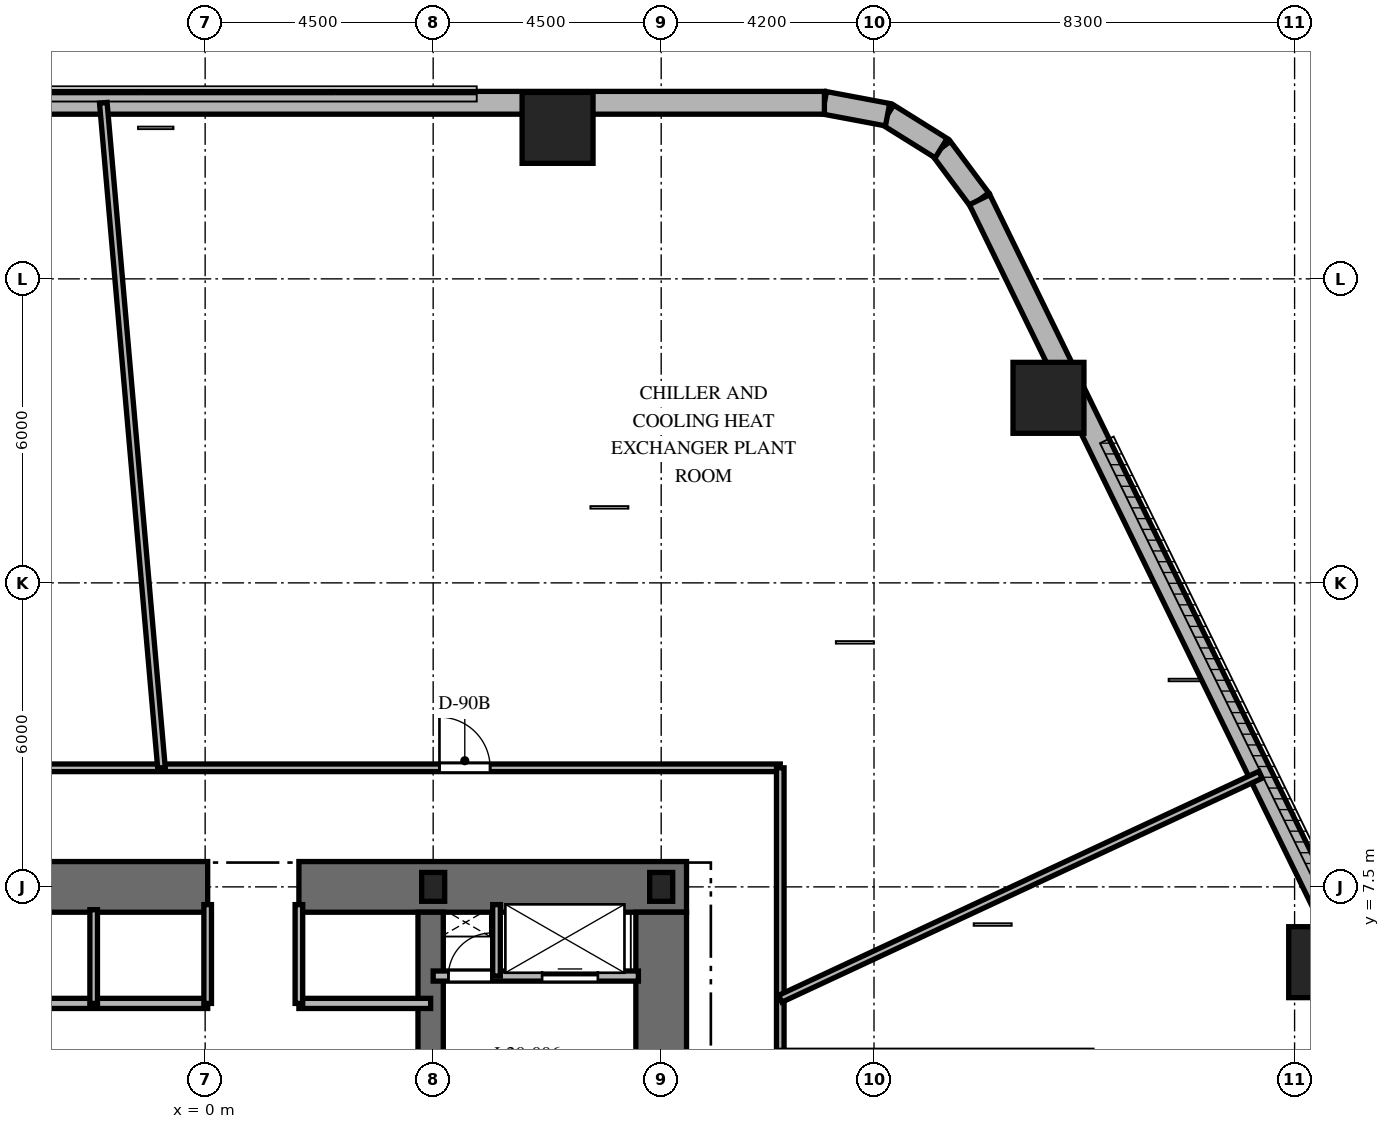
"""IFC4 building model, lengths in metres.
Left out: names, types, materials, properties, quantities, classifications, styles, units other than length and angle.
Written with IfcOpenShell. Run it as: python <this file> out.ifc"""

import sys

from ifc_helpers import new_model, si_unit, direction, frame, frame_2d, origin, origin_2d, place, context, subcontext, project, spatial, rectangle, i_section, extrude, element, fill, save


model = new_model("IFC4")
c1 = context("Model", 3, precision=1e-05, world=origin(), true_north=direction((0.0, 1.0)))
c2 = subcontext(c1, "Body", "Model", "MODEL_VIEW")
j1 = project(units=[si_unit("LENGTHUNIT", "METRE"), si_unit("PLANEANGLEUNIT", "RADIAN")], contexts=[c1])
p1 = place(None, origin())
s1 = spatial("IfcSite", under=j1, at=p1, CompositionType="ELEMENT")
p2 = place(p1, origin())
s2 = spatial("IfcBuilding", under=s1, at=p2, CompositionType="ELEMENT")
p3 = place(p2, frame((0.0, 0.0, 86.0)))
s3 = spatial("IfcBuildingStorey", under=s2, at=p3, CompositionType="ELEMENT", Elevation=86.0)
p4 = place(p3, frame((-9.5, 7.5, 0.0), z_axis=(0.0, 0.0, 1.0), x_axis=(1.0, 0.0, 0.0)))
e1 = element("IfcWall", 1, at=p4, inside=s3, PredefinedType="SHEAR", context=c2, shape_type="SweptSolid", body=[
    extrude(rectangle(XDim=9.55, YDim=1.0, at=frame_2d((4.775, 0.0))), origin(), (0.0, 0.0, 1.0), 5.4),
])
p5 = place(p3, frame((1.85, 7.5, 0.0), z_axis=(0.0, 0.0, 1.0), x_axis=(1.0, 0.0, 0.0)))
e2 = element("IfcWall", 2, at=p5, inside=s3, PredefinedType="SHEAR", context=c2, shape_type="SweptSolid", body=[
    extrude(rectangle(XDim=7.65, YDim=1.0, at=frame_2d((3.825, 0.0))), origin(), (0.0, 0.0, 1.0), 5.4),
])
p6 = place(p3, frame((9.0, -7.0, 0.0), z_axis=(0.0, 0.0, 1.0), x_axis=(0.0, 1.0, 0.0)))
e3 = element("IfcWall", 3, at=p6, inside=s3, PredefinedType="SHEAR", context=c2, shape_type="SweptSolid", body=[
    extrude(rectangle(XDim=14.0, YDim=1.0, at=frame_2d((7.0, 0.0))), origin(), (0.0, 0.0, 1.0), 5.4),
])
p7 = place(p6, frame((10.125, 0.0, 0.0)))
e4 = element("IfcOpeningElement", 4, at=p7, cuts=e3, PredefinedType="OPENING", context=c2, shape_type="SweptSolid", body=[
    extrude(rectangle(XDim=1.05, YDim=2.15, at=frame_2d((0.525, 1.075))), frame((0.0, 0.51, 0.0), z_axis=(0.0, -1.0, 0.0), x_axis=(1.0, 0.0, 0.0)), (0.0, 0.0, 1.0), 1.02),
])
p8 = place(p3, frame((4.45, 2.25, 0.0), z_axis=(0.0, 0.0, 1.0), x_axis=(0.0, 1.0, 0.0)))
e5 = element("IfcWall", 5, at=p8, inside=s3, PredefinedType="SHEAR", context=c2, shape_type="SweptSolid", body=[
    extrude(rectangle(XDim=4.75, YDim=0.5, at=frame_2d((2.375, 0.0))), origin(), (0.0, 0.0, 1.0), 5.4),
])
for number, where, z_axis, x_axis in (
    (6, (9.0, 7.5, 0.0), (0.0, 0.0, 1.0), (1.0, 0.0, 0.0)),
    (7, (4.5, 7.5, 0.0), (0.0, 0.0, 1.0), (1.0, 0.0, 0.0)),
):
    element("IfcColumn", number, at=place(p3, frame(where, z_axis=z_axis, x_axis=x_axis)), inside=s3, PredefinedType="COLUMN", context=c2, shape_type="SweptSolid", body=[
        extrude(i_section(OverallWidth=0.454, OverallDepth=0.569, WebThickness=0.078, FlangeThickness=0.125, at=origin_2d()), origin(), (0.0, 0.0, 1.0), 5.4),
    ])
for number, where, z_axis, x_axis in (
    (8, (22.084, 6.014, 0.0), (0.0, 0.0, 1.0), (1.0, 0.0, 0.0)),
    (9, (16.643, 17.152, 0.0), (0.0, 0.0, 1.0), (1.0, 0.0, 0.0)),
    (10, (6.955, 22.48, 0.0), (0.0, 0.0, 1.0), (1.0, 0.0, 0.0)),
):
    element("IfcColumn", number, at=place(p3, frame(where, z_axis=z_axis, x_axis=x_axis)), inside=s3, PredefinedType="COLUMN", context=c2, shape_type="SweptSolid", body=[
        extrude(rectangle(XDim=1.4, YDim=1.4, at=origin_2d()), origin(), (0.0, 0.0, 1.0), 5.4),
    ])
p9 = place(p3, frame((15.284, 21.062, 0.0), z_axis=(0.0, 0.0, 1.0), x_axis=(-0.597595366449, 0.801797841104, 0.0)))
e11 = element("IfcWall", 11, at=p9, inside=s3, PredefinedType="SOLIDWALL", context=c2, shape_type="SweptSolid", body=[
    extrude(rectangle(XDim=1.269, YDim=0.45, at=frame_2d((0.634, 0.0))), origin(), (0.0, 0.0, 1.0), 5.1),
])
p10 = place(p3, frame((14.526, 22.08, 0.0), z_axis=(0.0, 0.0, 1.0), x_axis=(-0.848185203596, 0.529699783275, 0.0)))
e12 = element("IfcWall", 12, at=p10, inside=s3, PredefinedType="SOLIDWALL", context=c2, shape_type="SweptSolid", body=[
    extrude(rectangle(XDim=1.247, YDim=0.45, at=frame_2d((0.624, 0.0))), origin(), (0.0, 0.0, 1.0), 5.1),
])
p11 = place(p3, frame((13.468, 22.74, 0.0), z_axis=(0.0, 0.0, 1.0), x_axis=(-0.982717174228, 0.185113358451, 0.0)))
e13 = element("IfcWall", 13, at=p11, inside=s3, PredefinedType="SOLIDWALL", context=c2, shape_type="SweptSolid", body=[
    extrude(rectangle(XDim=1.269, YDim=0.45, at=frame_2d((0.634, 0.0))), origin(), (0.0, 0.0, 1.0), 5.1),
])
p12 = place(p3, frame((24.336, 2.532, 0.0), z_axis=(0.0, 0.0, 1.0), x_axis=(-0.438931326393, 0.898520612291, 0.0)))
e14 = element("IfcWall", 14, at=p12, inside=s3, PredefinedType="SOLIDWALL", context=c2, shape_type="SweptSolid", body=[
    extrude(rectangle(XDim=20.623, YDim=0.45, at=frame_2d((10.312, 0.0))), origin(), (0.0, 0.0, 1.0), 5.1),
])
p13 = place(p3, frame((12.221, 22.975, 0.0), z_axis=(0.0, 0.0, 1.0), x_axis=(-1.0, 0.0, 0.0)))
e15 = element("IfcWall", 15, at=p13, inside=s3, PredefinedType="SOLIDWALL", context=c2, shape_type="SweptSolid", body=[
    extrude(rectangle(XDim=26.389, YDim=0.45, at=frame_2d((13.195, 0.0))), origin(), (0.0, 0.0, 1.0), 5.1),
])
p14 = place(p3, frame((4.5, 5.74, 0.0), z_axis=(0.0, 0.0, 1.0), x_axis=(1.0, 0.0, 0.0)))
e16 = element("IfcWall", 16, at=p14, inside=s3, PredefinedType="PARTITIONING", context=c2, shape_type="SweptSolid", body=[
    extrude(rectangle(XDim=4.05, YDim=0.2, at=frame_2d((2.025, 0.0))), origin(), (0.0, 0.0, 1.0), 5.1),
])
p15 = place(p14, frame((0.3, 0.0, 0.0)))
e17 = element("IfcOpeningElement", 17, at=p15, cuts=e16, PredefinedType="OPENING", context=c2, shape_type="SweptSolid", body=[
    extrude(rectangle(XDim=0.85, YDim=2.03, at=frame_2d((0.425, 1.015))), frame((0.0, 0.11, 0.0), z_axis=(0.0, -1.0, 0.0), x_axis=(1.0, 0.0, 0.0)), (0.0, 0.0, 1.0), 0.22),
])
p16 = place(p14, frame((2.15, 0.0, 0.0)))
e18 = element("IfcOpeningElement", 18, at=p16, cuts=e16, PredefinedType="OPENING", context=c2, shape_type="SweptSolid", body=[
    extrude(rectangle(XDim=1.1, YDim=2.2, at=frame_2d((0.55, 1.1))), frame((0.0, 0.11, 0.0), z_axis=(0.0, -1.0, 0.0), x_axis=(1.0, 0.0, 0.0)), (0.0, 0.0, 1.0), 0.22),
])
p17 = place(p3, frame((5.75, 5.74, 0.0), z_axis=(0.0, 0.0, 1.0), x_axis=(0.0, 1.0, 0.0)))
e19 = element("IfcWall", 19, at=p17, inside=s3, PredefinedType="PARTITIONING", context=c2, shape_type="SweptSolid", body=[
    extrude(rectangle(XDim=1.41, YDim=0.15, at=frame_2d((0.705, 0.0))), origin(), (0.0, 0.0, 1.0), 5.1),
])
p18 = place(p3, frame((-4.45, 5.2, 0.0), z_axis=(0.0, 0.0, 1.0), x_axis=(1.0, 0.0, 0.0)))
e20 = element("IfcWall", 20, at=p18, inside=s3, PredefinedType="PARTITIONING", context=c2, shape_type="SweptSolid", body=[
    extrude(rectangle(XDim=4.5, YDim=0.2, at=frame_2d((2.25, 0.0))), origin(), (0.0, 0.0, 1.0), 5.1),
])
p19 = place(p3, frame((1.85, 5.2, 0.0), z_axis=(0.0, 0.0, 1.0), x_axis=(1.0, 0.0, 0.0)))
e21 = element("IfcWall", 21, at=p19, inside=s3, PredefinedType="PARTITIONING", context=c2, shape_type="SweptSolid", body=[
    extrude(rectangle(XDim=2.6, YDim=0.2, at=frame_2d((1.3, 0.0))), origin(), (0.0, 0.0, 1.0), 5.1),
])
p20 = place(p3, frame((-2.2, 5.2, 0.0), z_axis=(0.0, 0.0, 1.0), x_axis=(0.0, 1.0, 0.0)))
e22 = element("IfcWall", 22, at=p20, inside=s3, PredefinedType="PARTITIONING", context=c2, shape_type="SweptSolid", body=[
    extrude(rectangle(XDim=1.85, YDim=0.15, at=frame_2d((0.925, 0.0))), origin(), (0.0, 0.0, 1.0), 5.1),
])
for number, where, z_axis, x_axis in (
    (23, (0.05, 5.2, 0.0), (0.0, 0.0, 1.0), (0.0, 1.0, 0.0)),
    (24, (1.85, 5.2, 0.0), (0.0, 0.0, 1.0), (0.0, 1.0, 0.0)),
):
    element("IfcWall", number, at=place(p3, frame(where, z_axis=z_axis, x_axis=x_axis)), inside=s3, PredefinedType="PARTITIONING", context=c2, shape_type="SweptSolid", body=[
        extrude(rectangle(XDim=1.95, YDim=0.15, at=frame_2d((0.975, 0.0))), origin(), (0.0, 0.0, 1.0), 5.1),
    ])
p21 = place(p3, frame((-11.35, 9.85, 0.0), z_axis=(0.0, 0.0, 1.0), x_axis=(1.0, 0.0, 0.0)))
e25 = element("IfcWall", 25, at=p21, inside=s3, PredefinedType="PARTITIONING", context=c2, shape_type="SweptSolid", body=[
    extrude(rectangle(XDim=22.7, YDim=0.15, at=frame_2d((11.35, 0.0))), origin(), (0.0, 0.0, 1.0), 3.29),
])
p22 = place(p21, frame((15.974, 0.0, 0.0)))
e26 = element("IfcOpeningElement", 26, at=p22, cuts=e25, PredefinedType="OPENING", context=c2, shape_type="SweptSolid", body=[
    extrude(rectangle(XDim=1.0, YDim=2.15, at=frame_2d((0.5, 1.075))), frame((0.0, 0.085, 0.0), z_axis=(0.0, -1.0, 0.0), x_axis=(1.0, 0.0, 0.0)), (0.0, 0.0, 1.0), 0.17),
])
p23 = place(p3, frame((11.35, 9.85, 0.0), z_axis=(0.0, 0.0, 1.0), x_axis=(0.0, -1.0, 0.0)))
e27 = element("IfcWall", 27, at=p23, inside=s3, PredefinedType="PARTITIONING", context=c2, shape_type="SweptSolid", body=[
    extrude(rectangle(XDim=19.7, YDim=0.15, at=frame_2d((9.85, 0.0))), origin(), (0.0, 0.0, 1.0), 3.29),
])
p24 = place(p23, frame((7.825, 0.0, 0.0)))
e28 = element("IfcOpeningElement", 28, at=p24, cuts=e27, PredefinedType="OPENING", context=c2, shape_type="SweptSolid", body=[
    extrude(rectangle(XDim=1.05, YDim=2.15, at=frame_2d((0.525, 1.075))), frame((0.0, 0.085, 0.0), z_axis=(0.0, -1.0, 0.0), x_axis=(1.0, 0.0, 0.0)), (0.0, 0.0, 1.0), 0.17),
])
p25 = place(p23, frame((13.207, 0.0, 0.0)))
e29 = element("IfcOpeningElement", 29, at=p25, cuts=e27, PredefinedType="OPENING", context=c2, shape_type="SweptSolid", body=[
    extrude(rectangle(XDim=1.0, YDim=2.15, at=frame_2d((0.5, 1.075))), frame((0.0, 0.085, 0.0), z_axis=(0.0, -1.0, 0.0), x_axis=(1.0, 0.0, 0.0)), (0.0, 0.0, 1.0), 0.17),
])
p26 = place(p3, frame((11.35, 5.292, 0.0), z_axis=(0.0, 0.0, 1.0), x_axis=(0.906302978375, 0.422628573796, 0.0)))
e30 = element("IfcWall", 30, at=p26, inside=s3, PredefinedType="PARTITIONING", context=c2, shape_type="SweptSolid", body=[
    extrude(rectangle(XDim=10.458, YDim=0.15, at=frame_2d((5.229, 0.0))), origin(), (0.0, 0.0, 1.0), 3.29),
])
p27 = place(p3, frame((-0.862, 9.85, 0.0), z_axis=(0.0, 0.0, 1.0), x_axis=(-0.087148560643, 0.996195326418, 0.0)))
e31 = element("IfcWall", 31, at=p27, inside=s3, PredefinedType="PARTITIONING", context=c2, shape_type="SweptSolid", body=[
    extrude(rectangle(XDim=13.175, YDim=0.15, at=frame_2d((6.587, 0.0))), origin(), (0.0, 0.0, 1.0), 3.29),
])
p28 = place(p15, origin())
e32 = element("IfcDoor", 32, at=p28, inside=s3, OperationType="SINGLE_SWING_RIGHT", PredefinedType="DOOR", context=c2, shape_type="SweptSolid", body=[
    extrude(rectangle(XDim=0.85, YDim=2.03, at=frame_2d((0.425, 1.015))), frame((0.0, 0.025, 0.0), z_axis=(0.0, -1.0, 0.0), x_axis=(1.0, 0.0, 0.0)), (0.0, 0.0, 1.0), 0.05),
])
fill(e17, e32)
p29 = place(p16, origin())
e33 = element("IfcDoor", 33, at=p29, inside=s3, OperationType="SLIDING_TO_RIGHT", PredefinedType="DOOR", context=c2, shape_type="SweptSolid", body=[
    extrude(rectangle(XDim=1.1, YDim=2.2, at=frame_2d((0.55, 1.1))), frame((0.0, 0.025, 0.0), z_axis=(0.0, -1.0, 0.0), x_axis=(1.0, 0.0, 0.0)), (0.0, 0.0, 1.0), 0.05),
])
fill(e18, e33)
p30 = place(p22, origin())
e34 = element("IfcDoor", 34, at=p30, inside=s3, OperationType="SINGLE_SWING_LEFT", PredefinedType="DOOR", context=c2, shape_type="SweptSolid", body=[
    extrude(rectangle(XDim=1.0, YDim=2.15, at=frame_2d((0.5, 1.075))), frame((0.0, 0.025, 0.0), z_axis=(0.0, -1.0, 0.0), x_axis=(1.0, 0.0, 0.0)), (0.0, 0.0, 1.0), 0.05),
])
fill(e26, e34)
save(model, sys.argv[1])
